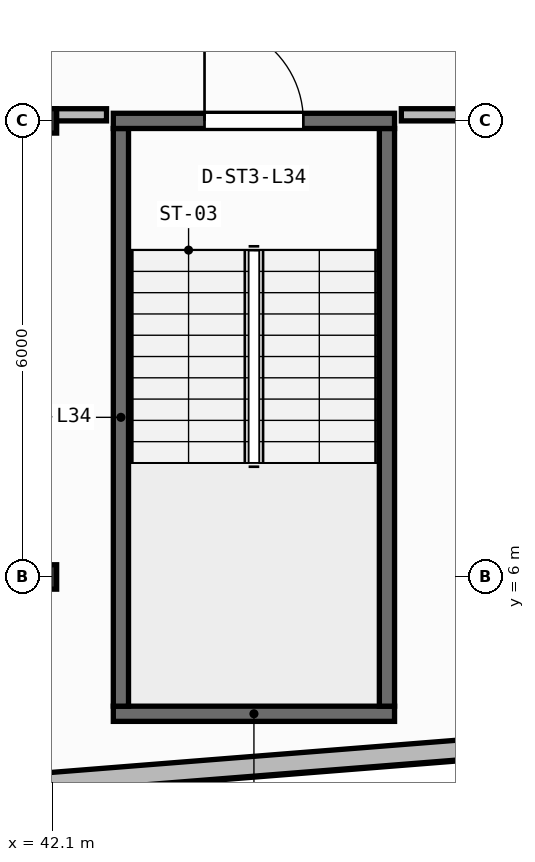
"""IFC4 building model, lengths in metres.
Left out: names, types, materials, properties, quantities, classifications, styles, units other than length and angle.
Written with IfcOpenShell. Run it as: python <this file> out.ifc"""

import sys

from ifc_helpers import new_model, si_unit, direction, frame, frame_2d, origin, origin_2d, place, context, subcontext, project, spatial, rectangle, i_section, extrude, element, fill, save


model = new_model("IFC4")
c1 = context("Model", 3, precision=1e-05, world=origin(), true_north=direction((0.0, 1.0)))
c2 = subcontext(c1, "Body", "Model", "MODEL_VIEW")
j1 = project(units=[si_unit("LENGTHUNIT", "METRE"), si_unit("PLANEANGLEUNIT", "RADIAN")], contexts=[c1])
p1 = place(None, origin())
s1 = spatial("IfcSite", under=j1, at=p1, CompositionType="ELEMENT")
p2 = place(p1, origin())
s2 = spatial("IfcBuilding", under=s1, at=p2, CompositionType="ELEMENT")
p3 = place(p2, frame((0.0, 0.0, 138.9)))
s3 = spatial("IfcBuildingStorey", under=s2, at=p3, CompositionType="ELEMENT", Elevation=138.9)
for number, where, z_axis, x_axis in (
    (1, (42.0, 6.0, 0.0), (0.0, 0.0, 1.0), (1.0, 0.0, 0.0)),
    (2, (42.0, 12.0, 0.0), (0.0, 0.0, 1.0), (1.0, 0.0, 0.0)),
):
    element("IfcColumn", number, at=place(p3, frame(where, z_axis=z_axis, x_axis=x_axis)), inside=s3, PredefinedType="COLUMN", context=c2, shape_type="SweptSolid", body=[
        extrude(i_section(OverallWidth=0.309, OverallDepth=0.321, WebThickness=0.014, FlangeThickness=0.022, FilletRadius=0.017, at=origin_2d()), origin(), (0.0, 0.0, 1.0), 3.95),
    ])
p4 = place(p3, frame((2.76, 0.173, 0.0), z_axis=(0.0, 0.0, 1.0), x_axis=(0.996857931723, 0.079210251617, 0.0)))
e3 = element("IfcWall", 3, at=p4, inside=s3, PredefinedType="STANDARD", context=c2, shape_type="SweptSolid", body=[
    extrude(rectangle(XDim=51.442, YDim=0.26, at=frame_2d((25.721, 0.0))), origin(), (0.0, 0.0, 1.0), 3.71),
])
p5 = place(p4, frame((24.521, 0.0, 0.9)))
e4 = element("IfcOpeningElement", 4, at=p5, cuts=e3, PredefinedType="OPENING", context=c2, shape_type="SweptSolid", body=[
    extrude(rectangle(XDim=2.4, YDim=1.65, at=frame_2d((1.2, 0.825))), frame((0.0, 0.14, 0.0), z_axis=(0.0, -1.0, 0.0), x_axis=(1.0, 0.0, 0.0)), (0.0, 0.0, 1.0), 0.28),
])
p6 = place(p3, frame((42.9, 4.2, 0.0), z_axis=(0.0, 0.0, 1.0), x_axis=(1.0, 0.0, 0.0)))
e5 = element("IfcWall", 5, at=p6, inside=s3, PredefinedType="SHEAR", context=c2, shape_type="SweptSolid", body=[
    extrude(rectangle(XDim=3.7, YDim=0.2, at=frame_2d((1.85, 0.0))), origin(), (0.0, 0.0, 1.0), 3.71),
])
for number, where, z_axis, x_axis in (
    (6, (43.0, 4.3, 0.0), (0.0, 0.0, 1.0), (0.0, 1.0, 0.0)),
    (7, (46.5, 4.3, 0.0), (0.0, 0.0, 1.0), (0.0, 1.0, 0.0)),
):
    element("IfcWall", number, at=place(p3, frame(where, z_axis=z_axis, x_axis=x_axis)), inside=s3, PredefinedType="SHEAR", context=c2, shape_type="SweptSolid", body=[
        extrude(rectangle(XDim=7.6, YDim=0.2, at=frame_2d((3.8, 0.0))), origin(), (0.0, 0.0, 1.0), 3.71),
    ])
p7 = place(p3, frame((42.9, 12.0, 0.0), z_axis=(0.0, 0.0, 1.0), x_axis=(1.0, 0.0, 0.0)))
e8 = element("IfcWall", 8, at=p7, inside=s3, PredefinedType="SHEAR", context=c2, shape_type="SweptSolid", body=[
    extrude(rectangle(XDim=3.7, YDim=0.2, at=frame_2d((1.85, 0.0))), origin(), (0.0, 0.0, 1.0), 3.71),
])
p8 = place(p7, frame((1.2, 0.0, 0.0)))
e9 = element("IfcOpeningElement", 9, at=p8, cuts=e8, PredefinedType="OPENING", context=c2, shape_type="SweptSolid", body=[
    extrude(rectangle(XDim=1.3, YDim=2.15, at=frame_2d((0.65, 1.075))), frame((0.0, 0.11, 0.0), z_axis=(0.0, -1.0, 0.0), x_axis=(1.0, 0.0, 0.0)), (0.0, 0.0, 1.0), 0.22),
])
p9 = place(p3, frame((40.03, 12.08, 0.0), z_axis=(0.0, 0.0, 1.0), x_axis=(1.0, 0.0, 0.0)))
e10 = element("IfcWall", 10, at=p9, inside=s3, PredefinedType="PARTITIONING", context=c2, shape_type="SweptSolid", body=[
    extrude(rectangle(XDim=2.781, YDim=0.16, at=frame_2d((1.39, 0.0))), origin(), (0.0, 0.0, 1.0), 3.083),
])
p10 = place(p3, frame((46.689, 12.08, 0.0), z_axis=(0.0, 0.0, 1.0), x_axis=(1.0, 0.0, 0.0)))
e11 = element("IfcWall", 11, at=p10, inside=s3, PredefinedType="PARTITIONING", context=c2, shape_type="SweptSolid", body=[
    extrude(rectangle(XDim=3.011, YDim=0.16, at=frame_2d((1.505, 0.0))), origin(), (0.0, 0.0, 1.0), 3.083),
])
p11 = place(p8, origin())
e12 = element("IfcDoor", 12, at=p11, inside=s3, OperationType="SINGLE_SWING_LEFT", PredefinedType="DOOR", context=c2, shape_type="SweptSolid", body=[
    extrude(rectangle(XDim=1.3, YDim=2.15, at=frame_2d((0.65, 1.075))), frame((0.0, 0.025, 0.0), z_axis=(0.0, -1.0, 0.0), x_axis=(1.0, 0.0, 0.0)), (0.0, 0.0, 1.0), 0.05),
])
fill(e9, e12)
save(model, sys.argv[1])
